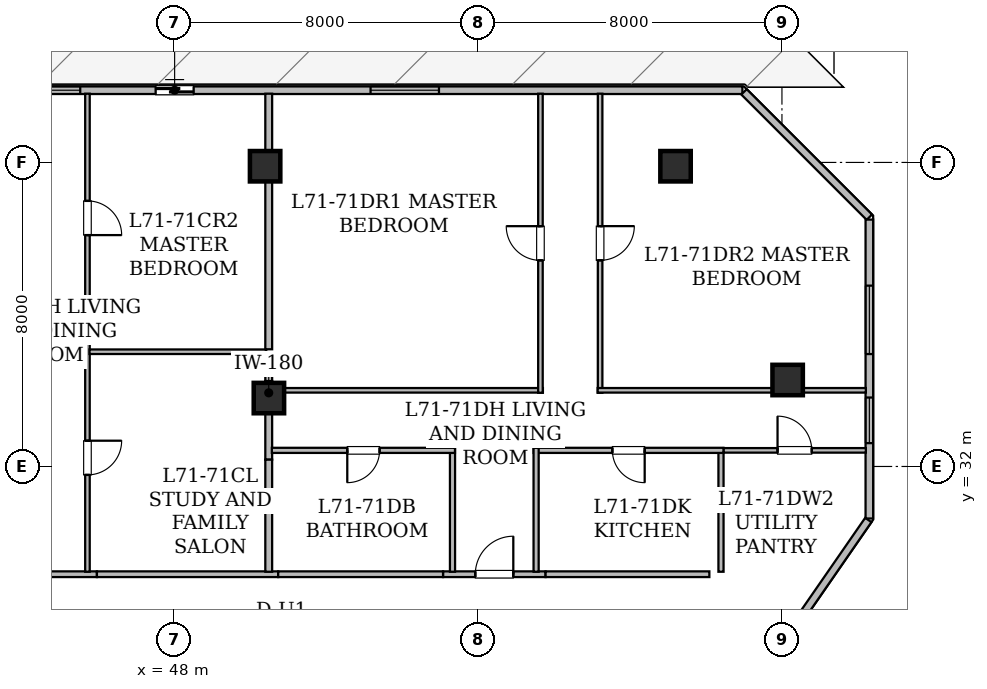
"""IFC4 building model, lengths in metres.
Left out: names, types, materials, properties, quantities, classifications, styles, units other than length and angle.
Written with IfcOpenShell. Run it as: python <this file> out.ifc"""

import sys

from ifc_helpers import new_model, si_unit, direction, frame, frame_2d, origin, origin_2d, place, context, subcontext, project, spatial, rectangle, hollow_rectangle, extrude, element, fill, save


model = new_model("IFC4")
c1 = context("Model", 3, precision=1e-05, world=origin(), true_north=direction((0.0, 1.0)))
c2 = subcontext(c1, "Body", "Model", "MODEL_VIEW")
j1 = project(units=[si_unit("LENGTHUNIT", "METRE"), si_unit("PLANEANGLEUNIT", "RADIAN")], contexts=[c1])
p1 = place(None, origin())
s1 = spatial("IfcSite", under=j1, at=p1, CompositionType="ELEMENT")
p2 = place(p1, origin())
s2 = spatial("IfcBuilding", under=s1, at=p2, CompositionType="ELEMENT")
p3 = place(p2, frame((0.0, 0.0, 277.85)))
s3 = spatial("IfcBuildingStorey", under=s2, at=p3, CompositionType="ELEMENT", Elevation=277.85)
for number, where, z_axis, x_axis in (
    (1, (50.4, 39.9, 0.025), (0.0, 0.0, 1.0), (1.0, 0.0, 0.0)),
    (2, (61.2, 39.9, 0.025), (0.0, 0.0, 1.0), (1.0, 0.0, 0.0)),
    (3, (64.15, 34.275, 0.025), (0.0, 0.0, 1.0), (1.0, 0.0, 0.0)),
):
    element("IfcColumn", number, at=place(p3, frame(where, z_axis=z_axis, x_axis=x_axis)), inside=s3, PredefinedType="COLUMN", context=c2, shape_type="SweptSolid", body=[
        extrude(hollow_rectangle(XDim=0.8, YDim=0.8, WallThickness=0.04, at=origin_2d()), origin(), (0.0, 0.0, 1.0), 4.175),
    ])
p4 = place(p3, frame((50.5, 33.8, 0.0), z_axis=(0.0, 0.0, 1.0), x_axis=(1.0, 0.0, 0.0)))
e4 = element("IfcColumn", 4, at=p4, inside=s3, PredefinedType="COLUMN", context=c2, shape_type="SweptSolid", body=[
    extrude(hollow_rectangle(XDim=0.8, YDim=0.8, WallThickness=0.04, at=origin_2d()), origin(), (0.0, 0.0, 1.0), 4.2),
])
p5 = place(p3, frame((27.102, 41.9, 0.0), z_axis=(0.0, 0.0, 1.0), x_axis=(1.0, 0.0, 0.0)))
e5 = element("IfcWall", 5, at=p5, inside=s3, PredefinedType="STANDARD", context=c2, shape_type="SweptSolid", body=[
    extrude(rectangle(XDim=35.857, YDim=0.2, at=frame_2d((17.928, 0.0))), origin(), (0.0, 0.0, 1.0), 3.95),
])
p6 = place(p5, frame((20.417, 0.0, 0.0)))
e6 = element("IfcOpeningElement", 6, at=p6, cuts=e5, PredefinedType="OPENING", context=c2, shape_type="SweptSolid", body=[
    extrude(rectangle(XDim=1.0, YDim=2.15, at=frame_2d((0.5, 1.075))), frame((0.0, 0.11, 0.0), z_axis=(0.0, -1.0, 0.0), x_axis=(1.0, 0.0, 0.0)), (0.0, 0.0, 1.0), 0.22),
])
p7 = place(p5, frame((7.108, 0.0, 0.85)))
e7 = element("IfcOpeningElement", 7, at=p7, cuts=e5, PredefinedType="OPENING", context=c2, shape_type="SweptSolid", body=[
    extrude(rectangle(XDim=1.8, YDim=0.92, at=frame_2d((0.9, 0.46))), frame((0.0, 0.11, 0.0), z_axis=(0.0, -1.0, 0.0), x_axis=(1.0, 0.0, 0.0)), (0.0, 0.0, 1.0), 0.22),
])
p8 = place(p5, frame((17.233, 0.0, 0.78)))
e8 = element("IfcOpeningElement", 8, at=p8, cuts=e5, PredefinedType="OPENING", context=c2, shape_type="SweptSolid", body=[
    extrude(rectangle(XDim=1.2, YDim=1.5, at=frame_2d((0.6, 0.75))), frame((0.0, 0.11, 0.0), z_axis=(0.0, -1.0, 0.0), x_axis=(1.0, 0.0, 0.0)), (0.0, 0.0, 1.0), 0.22),
])
p9 = place(p5, frame((26.073, 0.0, 0.85)))
e9 = element("IfcOpeningElement", 9, at=p9, cuts=e5, PredefinedType="OPENING", context=c2, shape_type="SweptSolid", body=[
    extrude(rectangle(XDim=1.8, YDim=0.92, at=frame_2d((0.9, 0.46))), frame((0.0, 0.11, 0.0), z_axis=(0.0, -1.0, 0.0), x_axis=(1.0, 0.0, 0.0)), (0.0, 0.0, 1.0), 0.22),
])
p10 = place(p3, frame((63.002, 41.857, 0.0), z_axis=(0.0, 0.0, 1.0), x_axis=(0.707132953363, -0.707080608041, 0.0)))
e10 = element("IfcWall", 10, at=p10, inside=s3, PredefinedType="STANDARD", context=c2, shape_type="SweptSolid", body=[
    extrude(rectangle(XDim=4.664, YDim=0.2, at=frame_2d((2.332, 0.0))), origin(), (0.0, 0.0, 1.0), 3.95),
])
p11 = place(p3, frame((66.3, 38.496, 0.0), z_axis=(0.0, 0.0, 1.0), x_axis=(0.0, -1.0, 0.0)))
e11 = element("IfcWall", 11, at=p11, inside=s3, PredefinedType="STANDARD", context=c2, shape_type="SweptSolid", body=[
    extrude(rectangle(XDim=7.865, YDim=0.2, at=frame_2d((3.933, 0.0))), origin(), (0.0, 0.0, 1.0), 3.95),
])
p12 = place(p11, frame((4.682, 0.0, 0.78)))
e12 = element("IfcOpeningElement", 12, at=p12, cuts=e11, PredefinedType="OPENING", context=c2, shape_type="SweptSolid", body=[
    extrude(rectangle(XDim=1.2, YDim=1.5, at=frame_2d((0.6, 0.75))), frame((0.0, 0.11, 0.0), z_axis=(0.0, -1.0, 0.0), x_axis=(1.0, 0.0, 0.0)), (0.0, 0.0, 1.0), 0.22),
])
p13 = place(p11, frame((1.738, 0.0, 0.85)))
e13 = element("IfcOpeningElement", 13, at=p13, cuts=e11, PredefinedType="OPENING", context=c2, shape_type="SweptSolid", body=[
    extrude(rectangle(XDim=1.8, YDim=0.92, at=frame_2d((0.9, 0.46))), frame((0.0, 0.11, 0.0), z_axis=(0.0, -1.0, 0.0), x_axis=(1.0, 0.0, 0.0)), (0.0, 0.0, 1.0), 0.22),
])
p14 = place(p3, frame((66.273, 30.592, 0.0), z_axis=(0.0, 0.0, 1.0), x_axis=(-0.569302587555, -0.822128070195, 0.0)))
e14 = element("IfcWall", 14, at=p14, inside=s3, PredefinedType="STANDARD", context=c2, shape_type="SweptSolid", body=[
    extrude(rectangle(XDim=3.153, YDim=0.2, at=frame_2d((1.576, 0.0))), origin(), (0.0, 0.0, 1.0), 3.95),
])
p15 = place(p3, frame((43.896, 29.165, 0.0), z_axis=(0.0, 0.0, 1.0), x_axis=(1.0, 0.0, 0.0)))
e15 = element("IfcWall", 15, at=p15, inside=s3, PredefinedType="STANDARD", context=c2, shape_type="SweptSolid", body=[
    extrude(rectangle(XDim=2.078, YDim=0.15, at=frame_2d((1.039, 0.0))), origin(), (0.0, 0.0, 1.0), 3.95),
])
p16 = place(p3, frame((45.974, 29.165, 0.0), z_axis=(0.0, 0.0, 1.0), x_axis=(1.0, 0.0, 0.0)))
e16 = element("IfcWall", 16, at=p16, inside=s3, PredefinedType="STANDARD", context=c2, shape_type="SweptSolid", body=[
    extrude(rectangle(XDim=4.77, YDim=0.15, at=frame_2d((2.385, 0.0))), origin(), (0.0, 0.0, 1.0), 3.245),
])
p17 = place(p3, frame((55.082, 29.165, 0.0), z_axis=(0.0, 0.0, 1.0), x_axis=(1.0, 0.0, 0.0)))
e17 = element("IfcWall", 17, at=p17, inside=s3, PredefinedType="STANDARD", context=c2, shape_type="SweptSolid", body=[
    extrude(rectangle(XDim=2.698, YDim=0.15, at=frame_2d((1.349, 0.0))), origin(), (0.0, 0.0, 1.0), 3.95),
])
p18 = place(p17, frame((0.849, 0.0, 0.0)))
e18 = element("IfcOpeningElement", 18, at=p18, cuts=e17, PredefinedType="OPENING", context=c2, shape_type="SweptSolid", body=[
    extrude(rectangle(XDim=1.0, YDim=2.15, at=frame_2d((0.5, 1.075))), frame((0.0, 0.085, 0.0), z_axis=(0.0, -1.0, 0.0), x_axis=(1.0, 0.0, 0.0)), (0.0, 0.0, 1.0), 0.17),
])
p19 = place(p3, frame((50.744, 29.165, 0.0), z_axis=(0.0, 0.0, 1.0), x_axis=(1.0, 0.0, 0.0)))
e19 = element("IfcWall", 19, at=p19, inside=s3, PredefinedType="STANDARD", context=c2, shape_type="SweptSolid", body=[
    extrude(rectangle(XDim=4.338, YDim=0.15, at=frame_2d((2.169, 0.0))), origin(), (0.0, 0.0, 1.0), 3.95),
])
p20 = place(p3, frame((57.78, 29.165, 0.0), z_axis=(0.0, 0.0, 1.0), x_axis=(1.0, 0.0, 0.0)))
e20 = element("IfcWall", 20, at=p20, inside=s3, PredefinedType="STANDARD", context=c2, shape_type="SweptSolid", body=[
    extrude(rectangle(XDim=4.31, YDim=0.15, at=frame_2d((2.155, 0.0))), origin(), (0.0, 0.0, 1.0), 3.95),
])
p21 = place(p3, frame((45.725, 35.268, 0.0), z_axis=(0.0, 0.0, 1.0), x_axis=(0.0, -1.0, 0.0)))
e21 = element("IfcWall", 21, at=p21, inside=s3, PredefinedType="PARTITIONING", context=c2, shape_type="SweptSolid", body=[
    extrude(rectangle(XDim=6.038, YDim=0.12, at=frame_2d((3.019, 0.0))), origin(), (0.0, 0.0, 1.0), 3.245),
])
p22 = place(p21, frame((2.59, 0.0, 0.0)))
e22 = element("IfcOpeningElement", 22, at=p22, cuts=e21, PredefinedType="OPENING", context=c2, shape_type="SweptSolid", body=[
    extrude(rectangle(XDim=0.9, YDim=2.1, at=frame_2d((0.45, 1.05))), frame((0.0, 0.07, 0.0), z_axis=(0.0, -1.0, 0.0), x_axis=(1.0, 0.0, 0.0)), (0.0, 0.0, 1.0), 0.14),
])
p23 = place(p3, frame((45.725, 41.808, 0.0), z_axis=(0.0, 0.0, 1.0), x_axis=(0.0, -1.0, 0.0)))
e23 = element("IfcWall", 23, at=p23, inside=s3, PredefinedType="PARTITIONING", context=c2, shape_type="SweptSolid", body=[
    extrude(rectangle(XDim=6.54, YDim=0.12, at=frame_2d((3.27, 0.0))), origin(), (0.0, 0.0, 1.0), 3.245),
])
p24 = place(p23, frame((2.82, 0.0, 0.0)))
e24 = element("IfcOpeningElement", 24, at=p24, cuts=e23, PredefinedType="OPENING", context=c2, shape_type="SweptSolid", body=[
    extrude(rectangle(XDim=0.9, YDim=2.1, at=frame_2d((0.45, 1.05))), frame((0.0, 0.07, 0.0), z_axis=(0.0, -1.0, 0.0), x_axis=(1.0, 0.0, 0.0)), (0.0, 0.0, 1.0), 0.14),
])
p25 = place(p3, frame((45.779, 35.019, 0.0), z_axis=(0.0, 0.0, 1.0), x_axis=(1.0, 0.0, 0.0)))
e25 = element("IfcWall", 25, at=p25, inside=s3, PredefinedType="PARTITIONING", context=c2, shape_type="SweptSolid", body=[
    extrude(rectangle(XDim=4.651, YDim=0.12, at=frame_2d((2.325, 0.0))), origin(), (0.0, 0.0, 1.0), 3.245),
])
p26 = place(p3, frame((50.495, 34.248, 0.0), z_axis=(0.0, 0.0, 1.0), x_axis=(0.0, -1.0, 0.0)))
e26 = element("IfcWall", 26, at=p26, inside=s3, PredefinedType="STANDARD", context=c2, shape_type="SweptSolid", body=[
    extrude(rectangle(XDim=2.069, YDim=0.18, at=frame_2d((1.035, 0.0))), origin(), (0.0, 0.0, 1.0), 3.245),
])
p27 = place(p3, frame((50.495, 32.179, 0.0), z_axis=(0.0, 0.0, 1.0), x_axis=(0.0, -1.0, 0.0)))
e27 = element("IfcWall", 27, at=p27, inside=s3, PredefinedType="STANDARD", context=c2, shape_type="SweptSolid", body=[
    extrude(rectangle(XDim=2.949, YDim=0.18, at=frame_2d((1.475, 0.0))), origin(), (0.0, 0.0, 1.0), 3.245),
])
p28 = place(p3, frame((50.495, 34.954, 0.0), z_axis=(0.0, 0.0, 1.0), x_axis=(0.0, -1.0, 0.0)))
e28 = element("IfcWall", 28, at=p28, inside=s3, PredefinedType="STANDARD", context=c2, shape_type="SweptSolid", body=[
    extrude(rectangle(XDim=0.706, YDim=0.18, at=frame_2d((0.353, 0.0))), origin(), (0.0, 0.0, 1.0), 3.245),
])
p29 = place(p3, frame((50.495, 41.808, 0.0), z_axis=(0.0, 0.0, 1.0), x_axis=(0.0, -1.0, 0.0)))
e29 = element("IfcWall", 29, at=p29, inside=s3, PredefinedType="STANDARD", context=c2, shape_type="SweptSolid", body=[
    extrude(rectangle(XDim=6.724, YDim=0.18, at=frame_2d((3.362, 0.0))), origin(), (0.0, 0.0, 1.0), 3.245),
])
p30 = place(p3, frame((62.461, 32.424, 0.0), z_axis=(0.0, 0.0, 1.0), x_axis=(1.0, 0.0, 0.0)))
e30 = element("IfcWall", 30, at=p30, inside=s3, PredefinedType="PARTITIONING", context=c2, shape_type="SweptSolid", body=[
    extrude(rectangle(XDim=3.747, YDim=0.12, at=frame_2d((1.874, 0.0))), origin(), (0.0, 0.0, 1.0), 3.407),
])
p31 = place(p30, frame((1.423, 0.0, 0.0)))
e31 = element("IfcOpeningElement", 31, at=p31, cuts=e30, PredefinedType="OPENING", context=c2, shape_type="SweptSolid", body=[
    extrude(rectangle(XDim=0.9, YDim=2.1, at=frame_2d((0.45, 1.05))), frame((0.0, 0.07, 0.0), z_axis=(0.0, -1.0, 0.0), x_axis=(1.0, 0.0, 0.0)), (0.0, 0.0, 1.0), 0.14),
])
p32 = place(p3, frame((62.396, 29.23, 0.0), z_axis=(0.0, 0.0, 1.0), x_axis=(0.0, 1.0, 0.0)))
e32 = element("IfcWall", 32, at=p32, inside=s3, PredefinedType="PARTITIONING", context=c2, shape_type="SweptSolid", body=[
    extrude(rectangle(XDim=3.129, YDim=0.135, at=frame_2d((1.564, 0.0))), origin(), (0.0, 0.0, 1.0), 3.95),
])
p33 = place(p3, frame((55.331, 29.23, 0.0), z_axis=(0.0, 0.0, 1.0), x_axis=(0.0, 1.0, 0.0)))
e33 = element("IfcWall", 33, at=p33, inside=s3, PredefinedType="PARTITIONING", context=c2, shape_type="SweptSolid", body=[
    extrude(rectangle(XDim=3.259, YDim=0.135, at=frame_2d((1.629, 0.0))), origin(), (0.0, 0.0, 1.0), 3.95),
])
p34 = place(p3, frame((55.396, 32.424, 0.0), z_axis=(0.0, 0.0, 1.0), x_axis=(-1.0, 0.0, 0.0)))
e34 = element("IfcWall", 34, at=p34, inside=s3, PredefinedType="PARTITIONING", context=c2, shape_type="SweptSolid", body=[
    extrude(rectangle(XDim=4.819, YDim=0.135, at=frame_2d((2.41, 0.0))), origin(), (0.0, 0.0, 1.0), 3.245),
])
p35 = place(p34, frame((1.984, 0.0, 0.0)))
e35 = element("IfcOpeningElement", 35, at=p35, cuts=e34, PredefinedType="OPENING", context=c2, shape_type="SweptSolid", body=[
    extrude(rectangle(XDim=0.85, YDim=2.1, at=frame_2d((0.425, 1.05))), frame((0.0, 0.077, 0.0), z_axis=(0.0, -1.0, 0.0), x_axis=(1.0, 0.0, 0.0)), (0.0, 0.0, 1.0), 0.155),
])
p36 = place(p3, frame((62.461, 32.424, 0.0), z_axis=(0.0, 0.0, 1.0), x_axis=(-1.0, 0.0, 0.0)))
e36 = element("IfcWall", 36, at=p36, inside=s3, PredefinedType="PARTITIONING", context=c2, shape_type="SweptSolid", body=[
    extrude(rectangle(XDim=4.995, YDim=0.135, at=frame_2d((2.498, 0.0))), origin(), (0.0, 0.0, 1.0), 3.95),
])
p37 = place(p36, frame((2.073, 0.0, 0.0)))
e37 = element("IfcOpeningElement", 37, at=p37, cuts=e36, PredefinedType="OPENING", context=c2, shape_type="SweptSolid", body=[
    extrude(rectangle(XDim=0.85, YDim=2.1, at=frame_2d((0.425, 1.05))), frame((0.0, 0.077, 0.0), z_axis=(0.0, -1.0, 0.0), x_axis=(1.0, 0.0, 0.0)), (0.0, 0.0, 1.0), 0.155),
])
p38 = place(p3, frame((57.531, 32.489, 0.0), z_axis=(0.0, 0.0, 1.0), x_axis=(0.0, -1.0, 0.0)))
e38 = element("IfcWall", 38, at=p38, inside=s3, PredefinedType="PARTITIONING", context=c2, shape_type="SweptSolid", body=[
    extrude(rectangle(XDim=3.259, YDim=0.135, at=frame_2d((1.629, 0.0))), origin(), (0.0, 0.0, 1.0), 3.95),
])
p39 = place(p3, frame((50.577, 34.004, 0.0), z_axis=(0.0, 0.0, 1.0), x_axis=(1.0, 0.0, 0.0)))
e39 = element("IfcWall", 39, at=p39, inside=s3, PredefinedType="PARTITIONING", context=c2, shape_type="SweptSolid", body=[
    extrude(rectangle(XDim=7.133, YDim=0.12, at=frame_2d((3.566, 0.0))), origin(), (0.0, 0.0, 1.0), 3.245),
])
p40 = place(p3, frame((57.645, 33.939, 0.0), z_axis=(0.0, 0.0, 1.0), x_axis=(0.0, 1.0, 0.0)))
e40 = element("IfcWall", 40, at=p40, inside=s3, PredefinedType="PARTITIONING", context=c2, shape_type="SweptSolid", body=[
    extrude(rectangle(XDim=7.869, YDim=0.12, at=frame_2d((3.935, 0.0))), origin(), (0.0, 0.0, 1.0), 3.245),
])
p41 = place(p40, frame((3.484, 0.0, 0.0)))
e41 = element("IfcOpeningElement", 41, at=p41, cuts=e40, PredefinedType="OPENING", context=c2, shape_type="SweptSolid", body=[
    extrude(rectangle(XDim=0.9, YDim=2.1, at=frame_2d((0.45, 1.05))), frame((0.0, 0.07, 0.0), z_axis=(0.0, -1.0, 0.0), x_axis=(1.0, 0.0, 0.0)), (0.0, 0.0, 1.0), 0.14),
])
p42 = place(p3, frame((59.215, 41.808, 0.0), z_axis=(0.0, 0.0, 1.0), x_axis=(0.0, -1.0, 0.0)))
e42 = element("IfcWall", 42, at=p42, inside=s3, PredefinedType="PARTITIONING", context=c2, shape_type="SweptSolid", body=[
    extrude(rectangle(XDim=7.869, YDim=0.12, at=frame_2d((3.935, 0.0))), origin(), (0.0, 0.0, 1.0), 3.245),
])
p43 = place(p42, frame((3.484, 0.0, 0.0)))
e43 = element("IfcOpeningElement", 43, at=p43, cuts=e42, PredefinedType="OPENING", context=c2, shape_type="SweptSolid", body=[
    extrude(rectangle(XDim=0.9, YDim=2.1, at=frame_2d((0.45, 1.05))), frame((0.0, 0.07, 0.0), z_axis=(0.0, -1.0, 0.0), x_axis=(1.0, 0.0, 0.0)), (0.0, 0.0, 1.0), 0.14),
])
p44 = place(p3, frame((59.15, 34.004, 0.0), z_axis=(0.0, 0.0, 1.0), x_axis=(1.0, 0.0, 0.0)))
e44 = element("IfcWall", 44, at=p44, inside=s3, PredefinedType="PARTITIONING", context=c2, shape_type="SweptSolid", body=[
    extrude(rectangle(XDim=7.058, YDim=0.12, at=frame_2d((3.529, 0.0))), origin(), (0.0, 0.0, 1.0), 3.245),
])
p45 = place(p6, origin())
e45 = element("IfcDoor", 45, at=p45, inside=s3, OperationType="SLIDING_TO_LEFT", PredefinedType="DOOR", context=c2, shape_type="SweptSolid", body=[
    extrude(rectangle(XDim=1.0, YDim=2.15, at=frame_2d((0.5, 1.075))), frame((0.0, 0.025, 0.0), z_axis=(0.0, -1.0, 0.0), x_axis=(1.0, 0.0, 0.0)), (0.0, 0.0, 1.0), 0.05),
])
fill(e6, e45)
p46 = place(p8, origin())
e46 = element("IfcWindow", 46, at=p46, inside=s3, PartitioningType="SINGLE_PANEL", PredefinedType="WINDOW", context=c2, shape_type="SweptSolid", body=[
    extrude(rectangle(XDim=1.2, YDim=1.5, at=frame_2d((0.6, 0.75))), frame((0.0, 0.03, 0.0), z_axis=(0.0, -1.0, 0.0), x_axis=(1.0, 0.0, 0.0)), (0.0, 0.0, 1.0), 0.06),
])
fill(e8, e46)
p47 = place(p12, origin())
e47 = element("IfcWindow", 47, at=p47, inside=s3, PartitioningType="SINGLE_PANEL", PredefinedType="WINDOW", context=c2, shape_type="SweptSolid", body=[
    extrude(rectangle(XDim=1.2, YDim=1.5, at=frame_2d((0.6, 0.75))), frame((0.0, 0.03, 0.0), z_axis=(0.0, -1.0, 0.0), x_axis=(1.0, 0.0, 0.0)), (0.0, 0.0, 1.0), 0.06),
])
fill(e12, e47)
p48 = place(p9, origin())
e48 = element("IfcWindow", 48, at=p48, inside=s3, PartitioningType="SINGLE_PANEL", PredefinedType="WINDOW", context=c2, shape_type="SweptSolid", body=[
    extrude(rectangle(XDim=1.8, YDim=0.92, at=frame_2d((0.9, 0.46))), frame((0.0, 0.03, 0.0), z_axis=(0.0, -1.0, 0.0), x_axis=(1.0, 0.0, 0.0)), (0.0, 0.0, 1.0), 0.06),
])
fill(e9, e48)
p49 = place(p13, origin())
e49 = element("IfcWindow", 49, at=p49, inside=s3, PartitioningType="SINGLE_PANEL", PredefinedType="WINDOW", context=c2, shape_type="SweptSolid", body=[
    extrude(rectangle(XDim=1.8, YDim=0.92, at=frame_2d((0.9, 0.46))), frame((0.0, 0.03, 0.0), z_axis=(0.0, -1.0, 0.0), x_axis=(1.0, 0.0, 0.0)), (0.0, 0.0, 1.0), 0.06),
])
fill(e13, e49)
p50 = place(p18, origin())
e50 = element("IfcDoor", 50, at=p50, inside=s3, OperationType="SINGLE_SWING_RIGHT", PredefinedType="DOOR", context=c2, shape_type="SweptSolid", body=[
    extrude(rectangle(XDim=1.0, YDim=2.15, at=frame_2d((0.5, 1.075))), frame((0.0, 0.025, 0.0), z_axis=(0.0, -1.0, 0.0), x_axis=(1.0, 0.0, 0.0)), (0.0, 0.0, 1.0), 0.05),
])
fill(e18, e50)
p51 = place(p22, origin())
e51 = element("IfcDoor", 51, at=p51, inside=s3, OperationType="SINGLE_SWING_LEFT", PredefinedType="DOOR", context=c2, shape_type="SweptSolid", body=[
    extrude(rectangle(XDim=0.9, YDim=2.1, at=frame_2d((0.45, 1.05))), frame((0.0, 0.025, 0.0), z_axis=(0.0, -1.0, 0.0), x_axis=(1.0, 0.0, 0.0)), (0.0, 0.0, 1.0), 0.05),
])
fill(e22, e51)
p52 = place(p24, origin())
e52 = element("IfcDoor", 52, at=p52, inside=s3, OperationType="SINGLE_SWING_RIGHT", PredefinedType="DOOR", context=c2, shape_type="SweptSolid", body=[
    extrude(rectangle(XDim=0.9, YDim=2.1, at=frame_2d((0.45, 1.05))), frame((0.0, 0.025, 0.0), z_axis=(0.0, -1.0, 0.0), x_axis=(1.0, 0.0, 0.0)), (0.0, 0.0, 1.0), 0.05),
])
fill(e24, e52)
p53 = place(p31, origin())
e53 = element("IfcDoor", 53, at=p53, inside=s3, OperationType="SINGLE_SWING_LEFT", PredefinedType="DOOR", context=c2, shape_type="SweptSolid", body=[
    extrude(rectangle(XDim=0.9, YDim=2.1, at=frame_2d((0.45, 1.05))), frame((0.0, 0.025, 0.0), z_axis=(0.0, -1.0, 0.0), x_axis=(1.0, 0.0, 0.0)), (0.0, 0.0, 1.0), 0.05),
])
fill(e31, e53)
p54 = place(p35, origin())
e54 = element("IfcDoor", 54, at=p54, inside=s3, OperationType="SINGLE_SWING_RIGHT", PredefinedType="DOOR", context=c2, shape_type="SweptSolid", body=[
    extrude(rectangle(XDim=0.85, YDim=2.1, at=frame_2d((0.425, 1.05))), frame((0.0, 0.025, 0.0), z_axis=(0.0, -1.0, 0.0), x_axis=(1.0, 0.0, 0.0)), (0.0, 0.0, 1.0), 0.05),
])
fill(e35, e54)
p55 = place(p37, origin())
e55 = element("IfcDoor", 55, at=p55, inside=s3, OperationType="SINGLE_SWING_LEFT", PredefinedType="DOOR", context=c2, shape_type="SweptSolid", body=[
    extrude(rectangle(XDim=0.85, YDim=2.1, at=frame_2d((0.425, 1.05))), frame((0.0, 0.025, 0.0), z_axis=(0.0, -1.0, 0.0), x_axis=(1.0, 0.0, 0.0)), (0.0, 0.0, 1.0), 0.05),
])
fill(e37, e55)
p56 = place(p41, origin())
e56 = element("IfcDoor", 56, at=p56, inside=s3, OperationType="SINGLE_SWING_RIGHT", PredefinedType="DOOR", context=c2, shape_type="SweptSolid", body=[
    extrude(rectangle(XDim=0.9, YDim=2.1, at=frame_2d((0.45, 1.05))), frame((0.0, 0.025, 0.0), z_axis=(0.0, -1.0, 0.0), x_axis=(1.0, 0.0, 0.0)), (0.0, 0.0, 1.0), 0.05),
])
fill(e41, e56)
p57 = place(p43, origin())
e57 = element("IfcDoor", 57, at=p57, inside=s3, OperationType="SINGLE_SWING_LEFT", PredefinedType="DOOR", context=c2, shape_type="SweptSolid", body=[
    extrude(rectangle(XDim=0.9, YDim=2.1, at=frame_2d((0.45, 1.05))), frame((0.0, 0.025, 0.0), z_axis=(0.0, -1.0, 0.0), x_axis=(1.0, 0.0, 0.0)), (0.0, 0.0, 1.0), 0.05),
])
fill(e43, e57)
save(model, sys.argv[1])
